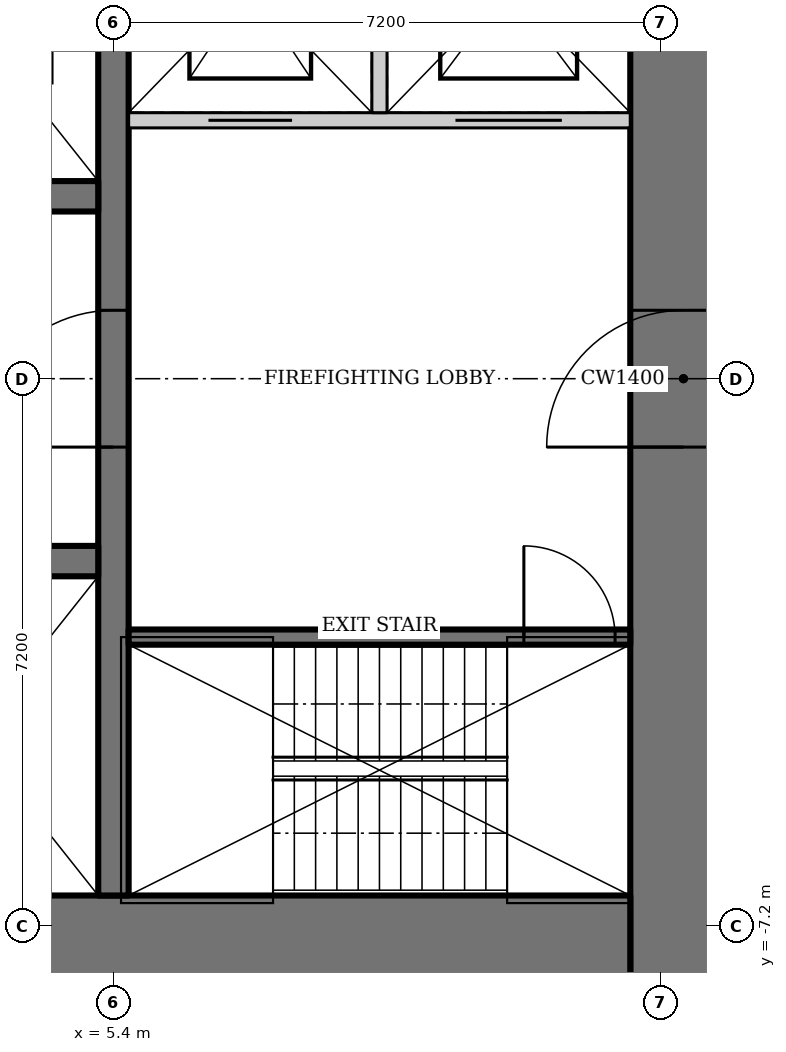
"""IFC4 building model, lengths in metres.
Left out: names, types, materials, properties, quantities, classifications, styles, units other than length and angle.
Written with IfcOpenShell. Run it as: python <this file> out.ifc"""

import sys

from ifc_helpers import new_model, si_unit, direction, frame, frame_2d, origin, place, context, subcontext, project, spatial, rectangle, extrude, element, fill, save


model = new_model("IFC4")
c1 = context("Model", 3, precision=1e-05, world=origin(), true_north=direction((0.0, 1.0)))
c2 = subcontext(c1, "Body", "Model", "MODEL_VIEW")
j1 = project(units=[si_unit("LENGTHUNIT", "METRE"), si_unit("PLANEANGLEUNIT", "RADIAN")], contexts=[c1])
p1 = place(None, origin())
s1 = spatial("IfcSite", under=j1, at=p1, CompositionType="ELEMENT")
p2 = place(p1, origin())
s2 = spatial("IfcBuilding", under=s1, at=p2, CompositionType="ELEMENT")
p3 = place(p2, frame((0.0, 0.0, 180.4)))
s3 = spatial("IfcBuildingStorey", under=s2, at=p3, CompositionType="ELEMENT", Elevation=180.4)
p4 = place(p3, frame((12.9, -13.0, 0.0), z_axis=(0.0, 0.0, 1.0), x_axis=(0.0, 1.0, 0.0)))
e1 = element("IfcWall", 1, at=p4, inside=s3, PredefinedType="SHEAR", context=c2, shape_type="SweptSolid", body=[
    extrude(rectangle(XDim=26.0, YDim=1.4, at=frame_2d((13.0, 0.0))), origin(), (0.0, 0.0, 1.0), 4.2),
])
p5 = place(p4, frame((12.1, 0.0, 0.0)))
e2 = element("IfcOpeningElement", 2, at=p5, cuts=e1, PredefinedType="OPENING", context=c2, shape_type="SweptSolid", body=[
    extrude(rectangle(XDim=1.8, YDim=2.1, at=frame_2d((0.9, 1.05))), frame((0.0, 0.71, 0.0), z_axis=(0.0, -1.0, 0.0), x_axis=(1.0, 0.0, 0.0)), (0.0, 0.0, 1.0), 1.42),
])
p6 = place(p3, frame((-12.2, -7.6, 0.0), z_axis=(0.0, 0.0, 1.0), x_axis=(1.0, 0.0, 0.0)))
e3 = element("IfcWall", 3, at=p6, inside=s3, PredefinedType="SHEAR", context=c2, shape_type="SweptSolid", body=[
    extrude(rectangle(XDim=24.4, YDim=1.6, at=frame_2d((12.2, 0.0))), origin(), (0.0, 0.0, 1.0), 4.2),
])
p7 = place(p3, frame((5.4, -6.8, 0.0), z_axis=(0.0, 0.0, 1.0), x_axis=(0.0, 1.0, 0.0)))
e4 = element("IfcWall", 4, at=p7, inside=s3, PredefinedType="SHEAR", context=c2, shape_type="SweptSolid", body=[
    extrude(rectangle(XDim=13.6, YDim=0.4, at=frame_2d((6.8, 0.0))), origin(), (0.0, 0.0, 1.0), 4.2),
])
p8 = place(p7, frame((5.9, 0.0, 0.0)))
e5 = element("IfcOpeningElement", 5, at=p8, cuts=e4, PredefinedType="OPENING", context=c2, shape_type="SweptSolid", body=[
    extrude(rectangle(XDim=1.8, YDim=2.1, at=frame_2d((0.9, 1.05))), frame((0.0, 0.21, 0.0), z_axis=(0.0, -1.0, 0.0), x_axis=(1.0, 0.0, 0.0)), (0.0, 0.0, 1.0), 0.42),
])
p9 = place(p3, frame((-5.2, -2.4, 0.0), z_axis=(0.0, 0.0, 1.0), x_axis=(1.0, 0.0, 0.0)))
e6 = element("IfcWall", 6, at=p9, inside=s3, PredefinedType="SHEAR", context=c2, shape_type="SweptSolid", body=[
    extrude(rectangle(XDim=10.4, YDim=0.4, at=frame_2d((5.2, 0.0))), origin(), (0.0, 0.0, 1.0), 4.2),
])
p10 = place(p3, frame((5.2, 2.4, 0.0), z_axis=(0.0, 0.0, 1.0), x_axis=(-1.0, 0.0, 0.0)))
e7 = element("IfcWall", 7, at=p10, inside=s3, PredefinedType="SHEAR", context=c2, shape_type="SweptSolid", body=[
    extrude(rectangle(XDim=10.4, YDim=0.4, at=frame_2d((5.2, 0.0))), origin(), (0.0, 0.0, 1.0), 4.2),
])
p11 = place(p10, frame((8.183, 0.0, 0.0)))
e8 = element("IfcOpeningElement", 8, at=p11, cuts=e7, PredefinedType="OPENING", context=c2, shape_type="SweptSolid", body=[
    extrude(rectangle(XDim=1.1, YDim=2.2, at=frame_2d((0.55, 1.1))), frame((0.0, 0.21, 0.0), z_axis=(0.0, -1.0, 0.0), x_axis=(1.0, 0.0, 0.0)), (0.0, 0.0, 1.0), 0.42),
])
p12 = place(p10, frame((4.65, 0.0, 0.0)))
e9 = element("IfcOpeningElement", 9, at=p12, cuts=e7, PredefinedType="OPENING", context=c2, shape_type="SweptSolid", body=[
    extrude(rectangle(XDim=1.1, YDim=2.2, at=frame_2d((0.55, 1.1))), frame((0.0, 0.21, 0.0), z_axis=(0.0, -1.0, 0.0), x_axis=(1.0, 0.0, 0.0)), (0.0, 0.0, 1.0), 0.42),
])
p13 = place(p10, frame((1.117, 0.0, 0.0)))
e10 = element("IfcOpeningElement", 10, at=p13, cuts=e7, PredefinedType="OPENING", context=c2, shape_type="SweptSolid", body=[
    extrude(rectangle(XDim=1.1, YDim=2.2, at=frame_2d((0.55, 1.1))), frame((0.0, 0.21, 0.0), z_axis=(0.0, -1.0, 0.0), x_axis=(1.0, 0.0, 0.0)), (0.0, 0.0, 1.0), 0.42),
])
p14 = place(p3, frame((5.6, -3.4, 0.0), z_axis=(0.0, 0.0, 1.0), x_axis=(1.0, 0.0, 0.0)))
e11 = element("IfcWall", 11, at=p14, inside=s3, PredefinedType="SHEAR", context=c2, shape_type="SweptSolid", body=[
    extrude(rectangle(XDim=6.6, YDim=0.2, at=frame_2d((3.3, 0.0))), origin(), (0.0, 0.0, 1.0), 4.2),
])
p15 = place(p14, frame((5.2, 0.0, 0.0)))
e12 = element("IfcOpeningElement", 12, at=p15, cuts=e11, PredefinedType="OPENING", context=c2, shape_type="SweptSolid", body=[
    extrude(rectangle(XDim=1.2, YDim=2.1, at=frame_2d((0.6, 1.05))), frame((0.0, 0.11, 0.0), z_axis=(0.0, -1.0, 0.0), x_axis=(1.0, 0.0, 0.0)), (0.0, 0.0, 1.0), 0.22),
])
p16 = place(p3, frame((12.2, 3.4, 0.0), z_axis=(0.0, 0.0, 1.0), x_axis=(-1.0, 0.0, 0.0)))
e13 = element("IfcWall", 13, at=p16, inside=s3, PredefinedType="SOLIDWALL", context=c2, shape_type="SweptSolid", body=[
    extrude(rectangle(XDim=6.6, YDim=0.2, at=frame_2d((3.3, 0.0))), origin(), (0.0, 0.0, 1.0), 4.2),
])
p17 = place(p16, frame((4.45, 0.0, 0.0)))
e14 = element("IfcOpeningElement", 14, at=p17, cuts=e13, PredefinedType="OPENING", context=c2, shape_type="SweptSolid", body=[
    extrude(rectangle(XDim=1.1, YDim=2.2, at=frame_2d((0.55, 1.1))), frame((0.0, 0.11, 0.0), z_axis=(0.0, -1.0, 0.0), x_axis=(1.0, 0.0, 0.0)), (0.0, 0.0, 1.0), 0.22),
])
p18 = place(p16, frame((0.9, 0.0, 0.0)))
e15 = element("IfcOpeningElement", 15, at=p18, cuts=e13, PredefinedType="OPENING", context=c2, shape_type="SweptSolid", body=[
    extrude(rectangle(XDim=1.4, YDim=2.2, at=frame_2d((0.7, 1.1))), frame((0.0, 0.11, 0.0), z_axis=(0.0, -1.0, 0.0), x_axis=(1.0, 0.0, 0.0)), (0.0, 0.0, 1.0), 0.22),
])
p19 = place(p3, frame((8.9, 3.5, 0.0), z_axis=(0.0, 0.0, 1.0), x_axis=(0.0, 1.0, 0.0)))
e16 = element("IfcWall", 16, at=p19, inside=s3, PredefinedType="SOLIDWALL", context=c2, shape_type="SweptSolid", body=[
    extrude(rectangle(XDim=3.3, YDim=0.2, at=frame_2d((1.65, 0.0))), origin(), (0.0, 0.0, 1.0), 4.2),
])
p20 = place(p8, origin())
e17 = element("IfcDoor", 17, at=p20, inside=s3, OperationType="DOUBLE_DOOR_DOUBLE_SWING", PredefinedType="DOOR", context=c2, shape_type="SweptSolid", body=[
    extrude(rectangle(XDim=1.8, YDim=2.1, at=frame_2d((0.9, 1.05))), frame((0.0, 0.025, 0.0), z_axis=(0.0, -1.0, 0.0), x_axis=(1.0, 0.0, 0.0)), (0.0, 0.0, 1.0), 0.05),
])
fill(e5, e17)
p21 = place(p15, origin())
e18 = element("IfcDoor", 18, at=p21, inside=s3, OperationType="SINGLE_SWING_RIGHT", PredefinedType="DOOR", context=c2, shape_type="SweptSolid", body=[
    extrude(rectangle(XDim=1.2, YDim=2.1, at=frame_2d((0.6, 1.05))), frame((0.0, 0.025, 0.0), z_axis=(0.0, -1.0, 0.0), x_axis=(1.0, 0.0, 0.0)), (0.0, 0.0, 1.0), 0.05),
])
fill(e12, e18)
p22 = place(p5, origin())
e19 = element("IfcDoor", 19, at=p22, inside=s3, OperationType="DOUBLE_DOOR_DOUBLE_SWING", PredefinedType="DOOR", context=c2, shape_type="SweptSolid", body=[
    extrude(rectangle(XDim=1.8, YDim=2.1, at=frame_2d((0.9, 1.05))), frame((0.0, 0.025, 0.0), z_axis=(0.0, -1.0, 0.0), x_axis=(1.0, 0.0, 0.0)), (0.0, 0.0, 1.0), 0.05),
])
fill(e2, e19)
p23 = place(p17, origin())
e20 = element("IfcDoor", 20, at=p23, inside=s3, OperationType="DOUBLE_DOOR_SLIDING", PredefinedType="DOOR", context=c2, shape_type="SweptSolid", body=[
    extrude(rectangle(XDim=1.1, YDim=2.2, at=frame_2d((0.55, 1.1))), frame((0.0, 0.025, 0.0), z_axis=(0.0, -1.0, 0.0), x_axis=(1.0, 0.0, 0.0)), (0.0, 0.0, 1.0), 0.05),
])
fill(e14, e20)
p24 = place(p18, origin())
e21 = element("IfcDoor", 21, at=p24, inside=s3, OperationType="DOUBLE_DOOR_SLIDING", PredefinedType="DOOR", context=c2, shape_type="SweptSolid", body=[
    extrude(rectangle(XDim=1.4, YDim=2.2, at=frame_2d((0.7, 1.1))), frame((0.0, 0.025, 0.0), z_axis=(0.0, -1.0, 0.0), x_axis=(1.0, 0.0, 0.0)), (0.0, 0.0, 1.0), 0.05),
])
fill(e15, e21)
save(model, sys.argv[1])
